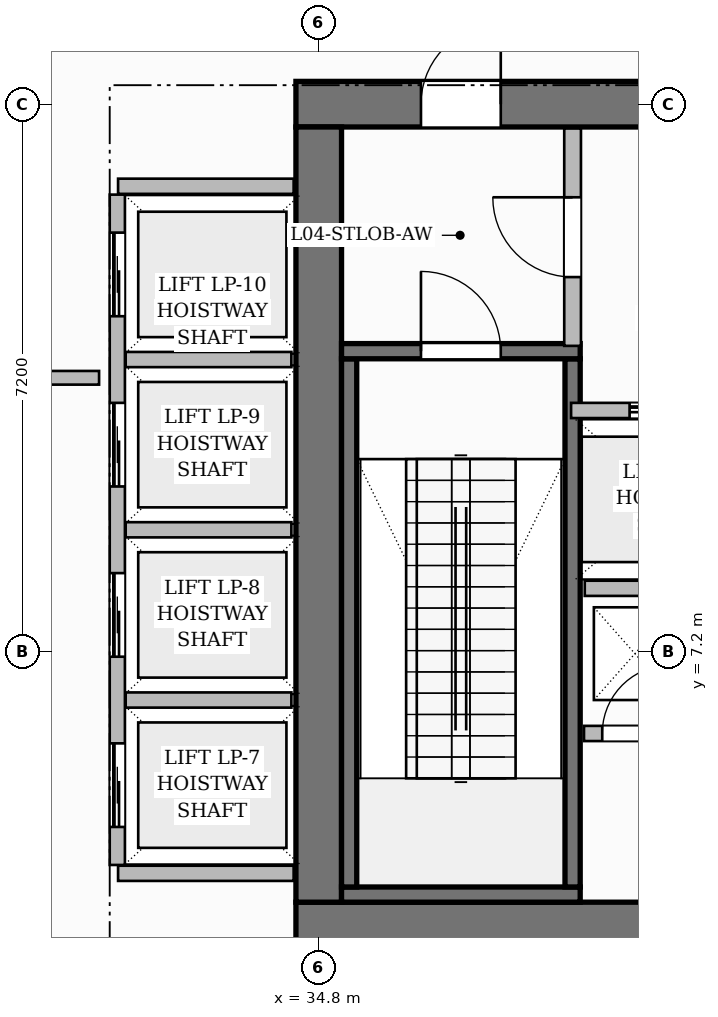
"""IFC4 building model, lengths in metres.
Left out: names, types, materials, properties, quantities, classifications, styles, units other than length and angle.
Written with IfcOpenShell. Run it as: python <this file> out.ifc"""

import sys

from ifc_helpers import new_model, si_unit, direction, frame, frame_2d, origin, place, context, subcontext, project, spatial, rectangle, extrude, source, transform, mapped, element, fill, save


model = new_model("IFC4")
c1 = context("Model", 3, precision=1e-05, world=origin(), true_north=direction((0.0, 1.0)))
c2 = subcontext(c1, "Body", "Model", "MODEL_VIEW")
j1 = project(units=[si_unit("LENGTHUNIT", "METRE"), si_unit("PLANEANGLEUNIT", "RADIAN")], contexts=[c1])
p1 = place(None, origin())
s1 = spatial("IfcSite", under=j1, at=p1, CompositionType="ELEMENT")
p2 = place(p1, origin())
s2 = spatial("IfcBuilding", under=s1, at=p2, CompositionType="ELEMENT")
p3 = place(p2, frame((0.0, 0.0, 21.6)))
s3 = spatial("IfcBuildingStorey", under=s2, at=p3, CompositionType="ELEMENT", Elevation=21.6)
p4 = place(p3, frame((34.5, 3.6, 0.0), z_axis=(0.0, 0.0, 1.0), x_axis=(1.0, 0.0, 0.0)))
e1 = element("IfcWall", 1, at=p4, inside=s3, PredefinedType="SHEAR", context=c2, shape_type="SweptSolid", body=[
    extrude(rectangle(XDim=15.6, YDim=0.6, at=frame_2d((7.8, 0.0))), origin(), (0.0, 0.0, 1.0), 5.4),
])
p5 = place(p4, frame((4.77, 0.0, 0.0)))
e2 = element("IfcOpeningElement", 2, at=p5, cuts=e1, PredefinedType="OPENING", context=c2, shape_type="SweptSolid", body=[
    extrude(rectangle(XDim=0.9, YDim=2.1, at=frame_2d((0.45, 1.05))), frame((0.0, 0.31, 0.0), z_axis=(0.0, -1.0, 0.0), x_axis=(1.0, 0.0, 0.0)), (0.0, 0.0, 1.0), 0.62),
])
p6 = place(p4, frame((7.15, 0.0, 0.0)))
e3 = element("IfcOpeningElement", 3, at=p6, cuts=e1, PredefinedType="OPENING", context=c2, shape_type="SweptSolid", body=[
    extrude(rectangle(XDim=0.9, YDim=2.1, at=frame_2d((0.45, 1.05))), frame((0.0, 0.31, 0.0), z_axis=(0.0, -1.0, 0.0), x_axis=(1.0, 0.0, 0.0)), (0.0, 0.0, 1.0), 0.62),
])
p7 = place(p3, frame((34.5, 14.4, 0.0), z_axis=(0.0, 0.0, 1.0), x_axis=(1.0, 0.0, 0.0)))
e4 = element("IfcWall", 4, at=p7, inside=s3, PredefinedType="SHEAR", context=c2, shape_type="SweptSolid", body=[
    extrude(rectangle(XDim=15.6, YDim=0.6, at=frame_2d((7.8, 0.0))), origin(), (0.0, 0.0, 1.0), 5.4),
])
p8 = place(p7, frame((5.43, 0.0, 0.0)))
e5 = element("IfcOpeningElement", 5, at=p8, cuts=e4, PredefinedType="OPENING", context=c2, shape_type="SweptSolid", body=[
    extrude(rectangle(XDim=1.5, YDim=2.2, at=frame_2d((0.75, 1.1))), frame((0.0, 0.31, 0.0), z_axis=(0.0, -1.0, 0.0), x_axis=(1.0, 0.0, 0.0)), (0.0, 0.0, 1.0), 0.62),
])
p9 = place(p7, frame((1.645, 0.0, 0.0)))
e6 = element("IfcOpeningElement", 6, at=p9, cuts=e4, PredefinedType="OPENING", context=c2, shape_type="SweptSolid", body=[
    extrude(rectangle(XDim=1.05, YDim=2.15, at=frame_2d((0.525, 1.075))), frame((0.0, 0.31, 0.0), z_axis=(0.0, -1.0, 0.0), x_axis=(1.0, 0.0, 0.0)), (0.0, 0.0, 1.0), 0.62),
])
p10 = place(p7, frame((11.275, 0.0, 0.0)))
e7 = element("IfcOpeningElement", 7, at=p10, cuts=e4, PredefinedType="OPENING", context=c2, shape_type="SweptSolid", body=[
    extrude(rectangle(XDim=1.05, YDim=2.15, at=frame_2d((0.525, 1.075))), frame((0.0, 0.31, 0.0), z_axis=(0.0, -1.0, 0.0), x_axis=(1.0, 0.0, 0.0)), (0.0, 0.0, 1.0), 0.62),
])
p11 = place(p3, frame((34.8, 3.9, 0.0), z_axis=(0.0, 0.0, 1.0), x_axis=(0.0, 1.0, 0.0)))
e8 = element("IfcWall", 8, at=p11, inside=s3, PredefinedType="SHEAR", context=c2, shape_type="SweptSolid", body=[
    extrude(rectangle(XDim=10.2, YDim=0.6, at=frame_2d((5.1, 0.0))), origin(), (0.0, 0.0, 1.0), 5.4),
])
p12 = place(p3, frame((35.1, 4.0, 0.0), z_axis=(0.0, 0.0, 1.0), x_axis=(1.0, 0.0, 0.0)))
e9 = element("IfcWall", 9, at=p12, inside=s3, PredefinedType="SHEAR", context=c2, shape_type="SweptSolid", body=[
    extrude(rectangle(XDim=3.14, YDim=0.2, at=frame_2d((1.57, 0.0))), origin(), (0.0, 0.0, 1.0), 5.4),
])
for number, where, z_axis, x_axis in (
    (10, (35.2, 4.1, 0.0), (0.0, 0.0, 1.0), (0.0, 1.0, 0.0)),
    (11, (38.14, 4.1, 0.0), (0.0, 0.0, 1.0), (0.0, 1.0, 0.0)),
):
    element("IfcWall", number, at=place(p3, frame(where, z_axis=z_axis, x_axis=x_axis)), inside=s3, PredefinedType="SHEAR", context=c2, shape_type="SweptSolid", body=[
        extrude(rectangle(XDim=6.95, YDim=0.2, at=frame_2d((3.475, 0.0))), origin(), (0.0, 0.0, 1.0), 5.4),
    ])
p13 = place(p3, frame((35.1, 11.15, 0.0), z_axis=(0.0, 0.0, 1.0), x_axis=(1.0, 0.0, 0.0)))
e12 = element("IfcWall", 12, at=p13, inside=s3, PredefinedType="SHEAR", context=c2, shape_type="SweptSolid", body=[
    extrude(rectangle(XDim=3.14, YDim=0.2, at=frame_2d((1.57, 0.0))), origin(), (0.0, 0.0, 1.0), 5.4),
])
p14 = place(p13, frame((1.045, 0.0, 0.0)))
e13 = element("IfcOpeningElement", 13, at=p14, cuts=e12, PredefinedType="OPENING", context=c2, shape_type="SweptSolid", body=[
    extrude(rectangle(XDim=1.05, YDim=2.2, at=frame_2d((0.525, 1.1))), frame((0.0, 0.11, 0.0), z_axis=(0.0, -1.0, 0.0), x_axis=(1.0, 0.0, 0.0)), (0.0, 0.0, 1.0), 0.22),
])
p15 = place(p3, frame((38.3, 8.03, 0.0), z_axis=(0.0, 0.0, 1.0), x_axis=(1.0, 0.0, 0.0)))
e14 = element("IfcWall", 14, at=p15, inside=s3, PredefinedType="PARTITIONING", context=c2, shape_type="SweptSolid", body=[
    extrude(rectangle(XDim=4.74, YDim=0.2, at=frame_2d((2.37, 0.0))), origin(), (0.0, 0.0, 1.0), 5.1),
])
p16 = place(p3, frame((38.14, 11.22, 0.0), z_axis=(0.0, 0.0, 1.0), x_axis=(0.0, 1.0, 0.0)))
e15 = element("IfcWall", 15, at=p16, inside=s3, PredefinedType="PARTITIONING", context=c2, shape_type="SweptSolid", body=[
    extrude(rectangle(XDim=2.86, YDim=0.22, at=frame_2d((1.43, 0.0))), origin(), (0.0, 0.0, 1.0), 5.1),
])
p17 = place(p16, frame((0.905, 0.0, 0.0)))
e16 = element("IfcOpeningElement", 16, at=p17, cuts=e15, PredefinedType="OPENING", context=c2, shape_type="SweptSolid", body=[
    extrude(rectangle(XDim=1.05, YDim=2.15, at=frame_2d((0.525, 1.075))), frame((0.0, 0.12, 0.0), z_axis=(0.0, -1.0, 0.0), x_axis=(1.0, 0.0, 0.0)), (0.0, 0.0, 1.0), 0.24),
])
p18 = place(p3, frame((38.29, 6.12, 0.0), z_axis=(0.0, 0.0, 1.0), x_axis=(1.0, 0.0, 0.0)))
e17 = element("IfcWall", 17, at=p18, inside=s3, PredefinedType="PARTITIONING", context=c2, shape_type="SweptSolid", body=[
    extrude(rectangle(XDim=1.38, YDim=0.2, at=frame_2d((0.69, 0.0))), origin(), (0.0, 0.0, 1.0), 5.1),
])
p19 = place(p18, frame((0.24, 0.0, 0.0)))
e18 = element("IfcOpeningElement", 18, at=p19, cuts=e17, PredefinedType="OPENING", context=c2, shape_type="SweptSolid", body=[
    extrude(rectangle(XDim=0.9, YDim=2.1, at=frame_2d((0.45, 1.05))), frame((0.0, 0.11, 0.0), z_axis=(0.0, -1.0, 0.0), x_axis=(1.0, 0.0, 0.0)), (0.0, 0.0, 1.0), 0.22),
])
for number, where, z_axis, x_axis in (
    (19, (32.16, 4.28, 0.0), (0.0, 0.0, 1.0), (1.0, 0.0, 0.0)),
    (20, (32.16, 13.32, 0.0), (0.0, 0.0, 1.0), (1.0, 0.0, 0.0)),
):
    element("IfcWall", number, at=place(p3, frame(where, z_axis=z_axis, x_axis=x_axis)), inside=s3, PredefinedType="PARTITIONING", context=c2, shape_type="SweptSolid", body=[
        extrude(rectangle(XDim=2.31, YDim=0.2, at=frame_2d((1.155, 0.0))), origin(), (0.0, 0.0, 1.0), 5.1),
    ])
p20 = place(p3, frame((32.15, 4.39, 0.0), z_axis=(0.0, 0.0, 1.0), x_axis=(0.0, 1.0, 0.0)))
e21 = element("IfcWall", 21, at=p20, inside=s3, PredefinedType="PARTITIONING", context=c2, shape_type="SweptSolid", body=[
    extrude(rectangle(XDim=8.82, YDim=0.2, at=frame_2d((4.41, 0.0))), origin(), (0.0, 0.0, 1.0), 5.1),
])
p21 = place(p20, frame((0.5, 0.0, 0.0)))
e22 = element("IfcOpeningElement", 22, at=p21, cuts=e21, PredefinedType="OPENING", context=c2, shape_type="SweptSolid", body=[
    extrude(rectangle(XDim=1.1, YDim=2.2, at=frame_2d((0.55, 1.1))), frame((0.0, 0.11, 0.0), z_axis=(0.0, -1.0, 0.0), x_axis=(1.0, 0.0, 0.0)), (0.0, 0.0, 1.0), 0.22),
])
p22 = place(p20, frame((2.74, 0.0, 0.0)))
e23 = element("IfcOpeningElement", 23, at=p22, cuts=e21, PredefinedType="OPENING", context=c2, shape_type="SweptSolid", body=[
    extrude(rectangle(XDim=1.1, YDim=2.2, at=frame_2d((0.55, 1.1))), frame((0.0, 0.11, 0.0), z_axis=(0.0, -1.0, 0.0), x_axis=(1.0, 0.0, 0.0)), (0.0, 0.0, 1.0), 0.22),
])
p23 = place(p20, frame((4.98, 0.0, 0.0)))
e24 = element("IfcOpeningElement", 24, at=p23, cuts=e21, PredefinedType="OPENING", context=c2, shape_type="SweptSolid", body=[
    extrude(rectangle(XDim=1.1, YDim=2.2, at=frame_2d((0.55, 1.1))), frame((0.0, 0.11, 0.0), z_axis=(0.0, -1.0, 0.0), x_axis=(1.0, 0.0, 0.0)), (0.0, 0.0, 1.0), 0.22),
])
p24 = place(p20, frame((7.22, 0.0, 0.0)))
e25 = element("IfcOpeningElement", 25, at=p24, cuts=e21, PredefinedType="OPENING", context=c2, shape_type="SweptSolid", body=[
    extrude(rectangle(XDim=1.1, YDim=2.2, at=frame_2d((0.55, 1.1))), frame((0.0, 0.11, 0.0), z_axis=(0.0, -1.0, 0.0), x_axis=(1.0, 0.0, 0.0)), (0.0, 0.0, 1.0), 0.22),
])
for number, where, z_axis, x_axis in (
    (26, (32.26, 6.56, 0.0), (0.0, 0.0, 1.0), (1.0, 0.0, 0.0)),
    (27, (32.26, 8.8, 0.0), (0.0, 0.0, 1.0), (1.0, 0.0, 0.0)),
    (28, (32.26, 11.04, 0.0), (0.0, 0.0, 1.0), (1.0, 0.0, 0.0)),
):
    element("IfcWall", number, at=place(p3, frame(where, z_axis=z_axis, x_axis=x_axis)), inside=s3, PredefinedType="PARTITIONING", context=c2, shape_type="SweptSolid", body=[
        extrude(rectangle(XDim=2.18, YDim=0.2, at=frame_2d((1.09, 0.0))), origin(), (0.0, 0.0, 1.0), 5.1),
    ])
p25 = place(p3, frame((-4.632, 10.8, 0.0), z_axis=(0.0, 0.0, 1.0), x_axis=(1.0, 0.0, 0.0)))
e29 = element("IfcWall", 29, at=p25, inside=s3, PredefinedType="PARTITIONING", context=c2, shape_type="SweptSolid", body=[
    extrude(rectangle(XDim=36.542, YDim=0.18, at=frame_2d((18.271, 0.0))), origin(), (0.0, 0.0, 1.0), 5.1),
])
p26 = place(p25, frame((4.207, 0.0, 0.0)))
e30 = element("IfcOpeningElement", 30, at=p26, cuts=e29, PredefinedType="OPENING", context=c2, shape_type="SweptSolid", body=[
    extrude(rectangle(XDim=1.6, YDim=2.4, at=frame_2d((0.8, 1.2))), frame((0.0, 0.1, 0.0), z_axis=(0.0, -1.0, 0.0), x_axis=(1.0, 0.0, 0.0)), (0.0, 0.0, 1.0), 0.2),
])
p27 = place(p25, frame((16.032, 0.0, 0.0)))
e31 = element("IfcOpeningElement", 31, at=p27, cuts=e29, PredefinedType="OPENING", context=c2, shape_type="SweptSolid", body=[
    extrude(rectangle(XDim=1.6, YDim=2.4, at=frame_2d((0.8, 1.2))), frame((0.0, 0.1, 0.0), z_axis=(0.0, -1.0, 0.0), x_axis=(1.0, 0.0, 0.0)), (0.0, 0.0, 1.0), 0.2),
])
p28 = place(p25, frame((29.432, 0.0, 0.0)))
e32 = element("IfcOpeningElement", 32, at=p28, cuts=e29, PredefinedType="OPENING", context=c2, shape_type="SweptSolid", body=[
    extrude(rectangle(XDim=1.6, YDim=2.4, at=frame_2d((0.8, 1.2))), frame((0.0, 0.1, 0.0), z_axis=(0.0, -1.0, 0.0), x_axis=(1.0, 0.0, 0.0)), (0.0, 0.0, 1.0), 0.2),
])
p29 = place(p3, frame((38.12, 10.37, 0.0), z_axis=(0.0, 0.0, 1.0), x_axis=(1.0, 0.0, 0.0)))
e33 = element("IfcWall", 33, at=p29, inside=s3, PredefinedType="PARTITIONING", context=c2, shape_type="SweptSolid", body=[
    extrude(rectangle(XDim=2.64, YDim=0.2, at=frame_2d((1.32, 0.0))), origin(), (0.0, 0.0, 1.0), 5.1),
])
p30 = place(p29, frame((0.77, 0.0, 0.0)))
e34 = element("IfcOpeningElement", 34, at=p30, cuts=e33, PredefinedType="OPENING", context=c2, shape_type="SweptSolid", body=[
    extrude(rectangle(XDim=1.1, YDim=2.2, at=frame_2d((0.55, 1.1))), frame((0.0, 0.11, 0.0), z_axis=(0.0, -1.0, 0.0), x_axis=(1.0, 0.0, 0.0)), (0.0, 0.0, 1.0), 0.22),
])
m1 = source(origin(), c2, "Body", "SweptSolid", [
    extrude(rectangle(XDim=1.05, YDim=2.2, at=frame_2d((0.525, 1.1))), frame((0.0, 0.025, 0.0), z_axis=(0.0, -1.0, 0.0), x_axis=(1.0, 0.0, 0.0)), (0.0, 0.0, 1.0), 0.05),
])
p31 = place(p14, origin())
e35 = element("IfcDoor", 35, at=p31, inside=s3, OperationType="SINGLE_SWING_LEFT", PredefinedType="DOOR", context=c2, shape_type="MappedRepresentation", body=[
    mapped(m1, transform((0.0, 0.0, 0.0), scale=1.0)),
])
fill(e13, e35)
m2 = source(origin(), c2, "Body", "SweptSolid", [
    extrude(rectangle(XDim=1.05, YDim=2.15, at=frame_2d((0.525, 1.075))), frame((0.0, 0.025, 0.0), z_axis=(0.0, -1.0, 0.0), x_axis=(1.0, 0.0, 0.0)), (0.0, 0.0, 1.0), 0.05),
])
p32 = place(p17, origin())
e36 = element("IfcDoor", 36, at=p32, inside=s3, OperationType="SINGLE_SWING_RIGHT", PredefinedType="DOOR", context=c2, shape_type="MappedRepresentation", body=[
    mapped(m2, transform((0.0, 0.0, 0.0), scale=1.0)),
])
fill(e16, e36)
p33 = place(p9, origin())
e37 = element("IfcDoor", 37, at=p33, inside=s3, OperationType="SINGLE_SWING_RIGHT", PredefinedType="DOOR", context=c2, shape_type="MappedRepresentation", body=[
    mapped(m2, transform((0.0, 0.0, 0.0), scale=1.0)),
])
fill(e6, e37)
m3 = source(origin(), c2, "Body", "SweptSolid", [
    extrude(rectangle(XDim=0.9, YDim=2.1, at=frame_2d((0.45, 1.05))), frame((0.0, 0.025, 0.0), z_axis=(0.0, -1.0, 0.0), x_axis=(1.0, 0.0, 0.0)), (0.0, 0.0, 1.0), 0.05),
])
p34 = place(p19, origin())
e38 = element("IfcDoor", 38, at=p34, inside=s3, OperationType="SINGLE_SWING_RIGHT", PredefinedType="DOOR", context=c2, shape_type="MappedRepresentation", body=[
    mapped(m3, transform((0.0, 0.0, 0.0), scale=1.0)),
])
fill(e18, e38)
m4 = source(origin(), c2, "Body", "SweptSolid", [
    extrude(rectangle(XDim=1.1, YDim=2.2, at=frame_2d((0.55, 1.1))), frame((0.0, 0.025, 0.0), z_axis=(0.0, -1.0, 0.0), x_axis=(1.0, 0.0, 0.0)), (0.0, 0.0, 1.0), 0.05),
])
p35 = place(p30, origin())
e39 = element("IfcDoor", 39, at=p35, inside=s3, OperationType="SLIDING_TO_LEFT", PredefinedType="DOOR", context=c2, shape_type="MappedRepresentation", body=[
    mapped(m4, transform((0.0, 0.0, 0.0), scale=1.0)),
])
fill(e34, e39)
p36 = place(p21, origin())
e40 = element("IfcDoor", 40, at=p36, inside=s3, OperationType="SLIDING_TO_LEFT", PredefinedType="DOOR", context=c2, shape_type="MappedRepresentation", body=[
    mapped(m4, transform((0.0, 0.0, 0.0), scale=1.0)),
])
fill(e22, e40)
p37 = place(p22, origin())
e41 = element("IfcDoor", 41, at=p37, inside=s3, OperationType="SLIDING_TO_LEFT", PredefinedType="DOOR", context=c2, shape_type="MappedRepresentation", body=[
    mapped(m4, transform((0.0, 0.0, 0.0), scale=1.0)),
])
fill(e23, e41)
p38 = place(p23, origin())
e42 = element("IfcDoor", 42, at=p38, inside=s3, OperationType="SLIDING_TO_LEFT", PredefinedType="DOOR", context=c2, shape_type="MappedRepresentation", body=[
    mapped(m4, transform((0.0, 0.0, 0.0), scale=1.0)),
])
fill(e24, e42)
p39 = place(p24, origin())
e43 = element("IfcDoor", 43, at=p39, inside=s3, OperationType="SLIDING_TO_LEFT", PredefinedType="DOOR", context=c2, shape_type="MappedRepresentation", body=[
    mapped(m4, transform((0.0, 0.0, 0.0), scale=1.0)),
])
fill(e25, e43)
save(model, sys.argv[1])
